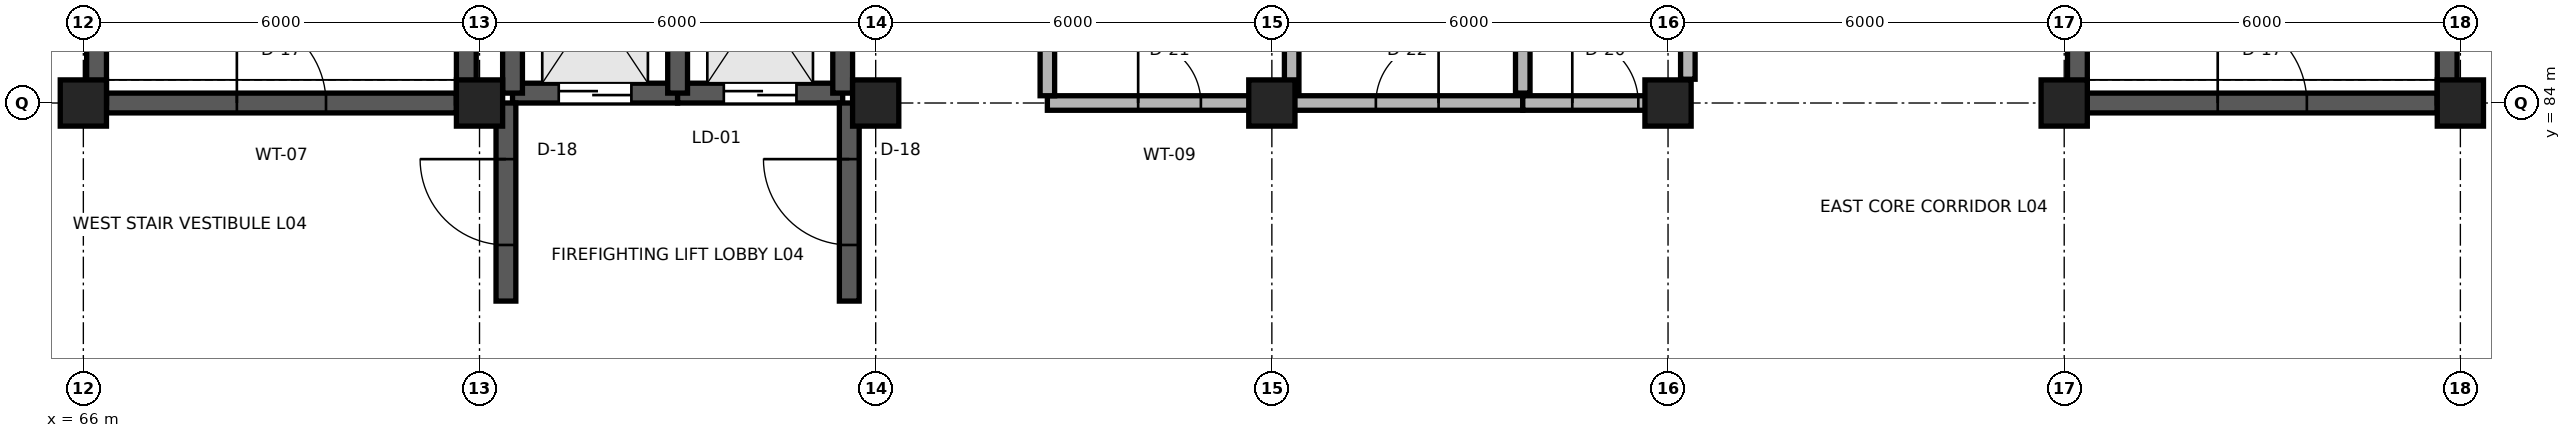
"""IFC4 building model, lengths in metres.
Left out: names, types, materials, properties, quantities, classifications, styles, units other than length and angle.
Written with IfcOpenShell. Run it as: python <this file> out.ifc"""

import sys

from ifc_helpers import new_model, si_unit, direction, frame, frame_2d, origin, origin_2d, place, context, subcontext, project, spatial, rectangle, extrude, element, fill, save


model = new_model("IFC4")
c1 = context("Model", 3, precision=1e-05, world=origin(), true_north=direction((0.0, 1.0)))
c2 = subcontext(c1, "Body", "Model", "MODEL_VIEW")
j1 = project(units=[si_unit("LENGTHUNIT", "METRE"), si_unit("PLANEANGLEUNIT", "RADIAN")], contexts=[c1])
p1 = place(None, origin())
s1 = spatial("IfcSite", under=j1, at=p1, CompositionType="ELEMENT")
p2 = place(p1, origin())
s2 = spatial("IfcBuilding", under=s1, at=p2, CompositionType="ELEMENT")
p3 = place(p2, frame((0.0, 0.0, 16.5)))
s3 = spatial("IfcBuildingStorey", under=s2, at=p3, CompositionType="ELEMENT", Elevation=16.5)
for number, where, z_axis, x_axis in (
    (1, (66.0, 84.0, 0.0), (0.0, 0.0, 1.0), (1.0, 0.0, 0.0)),
    (2, (72.0, 84.0, 0.0), (0.0, 0.0, 1.0), (1.0, 0.0, 0.0)),
    (3, (78.0, 84.0, 0.0), (0.0, 0.0, 1.0), (1.0, 0.0, 0.0)),
    (4, (84.0, 84.0, 0.0), (0.0, 0.0, 1.0), (1.0, 0.0, 0.0)),
    (5, (90.0, 84.0, 0.0), (0.0, 0.0, 1.0), (1.0, 0.0, 0.0)),
    (6, (96.0, 84.0, 0.0), (0.0, 0.0, 1.0), (1.0, 0.0, 0.0)),
    (7, (102.0, 84.0, 0.0), (0.0, 0.0, 1.0), (1.0, 0.0, 0.0)),
):
    element("IfcColumn", number, at=place(p3, frame(where, z_axis=z_axis, x_axis=x_axis)), inside=s3, PredefinedType="COLUMN", context=c2, shape_type="SweptSolid", body=[
        extrude(rectangle(XDim=0.7, YDim=0.7, at=origin_2d()), origin(), (0.0, 0.0, 1.0), 4.5),
    ])
p4 = place(p3, frame((66.35, 84.0, 0.0), z_axis=(0.0, 0.0, 1.0), x_axis=(1.0, 0.0, 0.0)))
e8 = element("IfcWall", 8, at=p4, inside=s3, PredefinedType="SHEAR", context=c2, shape_type="SweptSolid", body=[
    extrude(rectangle(XDim=5.3, YDim=0.3, at=frame_2d((2.65, 0.0))), origin(), (0.0, 0.0, 1.0), 4.26),
])
p5 = place(p4, frame((1.975, 0.0, 0.0)))
e9 = element("IfcOpeningElement", 9, at=p5, cuts=e8, PredefinedType="OPENING", context=c2, shape_type="SweptSolid", body=[
    extrude(rectangle(XDim=1.35, YDim=2.2, at=frame_2d((0.675, 1.1))), frame((0.0, 0.165, 0.0), z_axis=(0.0, -1.0, 0.0), x_axis=(1.0, 0.0, 0.0)), (0.0, 0.0, 1.0), 0.33),
])
for number, where, z_axis, x_axis in (
    (10, (66.2, 84.0, 0.0), (0.0, 0.0, 1.0), (0.0, 1.0, 0.0)),
    (11, (71.8, 84.0, 0.0), (0.0, 0.0, 1.0), (0.0, 1.0, 0.0)),
):
    element("IfcWall", number, at=place(p3, frame(where, z_axis=z_axis, x_axis=x_axis)), inside=s3, PredefinedType="SHEAR", context=c2, shape_type="SweptSolid", body=[
        extrude(rectangle(XDim=11.8, YDim=0.3, at=frame_2d((5.9, 0.0))), origin(), (0.0, 0.0, 1.0), 4.34),
    ])
p6 = place(p3, frame((96.35, 84.0, 0.0), z_axis=(0.0, 0.0, 1.0), x_axis=(1.0, 0.0, 0.0)))
e12 = element("IfcWall", 12, at=p6, inside=s3, PredefinedType="SHEAR", context=c2, shape_type="SweptSolid", body=[
    extrude(rectangle(XDim=5.3, YDim=0.3, at=frame_2d((2.65, 0.0))), origin(), (0.0, 0.0, 1.0), 4.26),
])
p7 = place(p6, frame((1.975, 0.0, 0.0)))
e13 = element("IfcOpeningElement", 13, at=p7, cuts=e12, PredefinedType="OPENING", context=c2, shape_type="SweptSolid", body=[
    extrude(rectangle(XDim=1.35, YDim=2.2, at=frame_2d((0.675, 1.1))), frame((0.0, 0.165, 0.0), z_axis=(0.0, -1.0, 0.0), x_axis=(1.0, 0.0, 0.0)), (0.0, 0.0, 1.0), 0.33),
])
for number, where, z_axis, x_axis in (
    (14, (96.2, 84.0, 0.0), (0.0, 0.0, 1.0), (0.0, 1.0, 0.0)),
    (15, (101.8, 84.0, 0.0), (0.0, 0.0, 1.0), (0.0, 1.0, 0.0)),
):
    element("IfcWall", number, at=place(p3, frame(where, z_axis=z_axis, x_axis=x_axis)), inside=s3, PredefinedType="SHEAR", context=c2, shape_type="SweptSolid", body=[
        extrude(rectangle(XDim=11.8, YDim=0.3, at=frame_2d((5.9, 0.0))), origin(), (0.0, 0.0, 1.0), 4.34),
    ])
p8 = place(p3, frame((72.5, 84.15, 0.0), z_axis=(0.0, 0.0, 1.0), x_axis=(1.0, 0.0, 0.0)))
e16 = element("IfcWall", 16, at=p8, inside=s3, PredefinedType="SHEAR", context=c2, shape_type="SweptSolid", body=[
    extrude(rectangle(XDim=2.5, YDim=0.3, at=frame_2d((1.25, 0.0))), origin(), (0.0, 0.0, 1.0), 4.34),
])
p9 = place(p8, frame((0.7, 0.0, 0.0)))
e17 = element("IfcOpeningElement", 17, at=p9, cuts=e16, PredefinedType="OPENING", context=c2, shape_type="SweptSolid", body=[
    extrude(rectangle(XDim=1.1, YDim=2.1, at=frame_2d((0.55, 1.05))), frame((0.0, 0.165, 0.0), z_axis=(0.0, -1.0, 0.0), x_axis=(1.0, 0.0, 0.0)), (0.0, 0.0, 1.0), 0.33),
])
p10 = place(p3, frame((72.5, 84.15, 0.0), z_axis=(0.0, 0.0, 1.0), x_axis=(0.0, 1.0, 0.0)))
e18 = element("IfcWall", 18, at=p10, inside=s3, PredefinedType="SHEAR", context=c2, shape_type="SweptSolid", body=[
    extrude(rectangle(XDim=3.4, YDim=0.3, at=frame_2d((1.7, 0.0))), origin(), (0.0, 0.0, 1.0), 4.34),
])
p11 = place(p3, frame((75.0, 84.15, 0.0), z_axis=(0.0, 0.0, 1.0), x_axis=(1.0, 0.0, 0.0)))
e19 = element("IfcWall", 19, at=p11, inside=s3, PredefinedType="SHEAR", context=c2, shape_type="SweptSolid", body=[
    extrude(rectangle(XDim=2.5, YDim=0.3, at=frame_2d((1.25, 0.0))), origin(), (0.0, 0.0, 1.0), 4.34),
])
p12 = place(p11, frame((0.7, 0.0, 0.0)))
e20 = element("IfcOpeningElement", 20, at=p12, cuts=e19, PredefinedType="OPENING", context=c2, shape_type="SweptSolid", body=[
    extrude(rectangle(XDim=1.1, YDim=2.1, at=frame_2d((0.55, 1.05))), frame((0.0, 0.165, 0.0), z_axis=(0.0, -1.0, 0.0), x_axis=(1.0, 0.0, 0.0)), (0.0, 0.0, 1.0), 0.33),
])
for number, where, z_axis, x_axis in (
    (21, (75.0, 84.15, 0.0), (0.0, 0.0, 1.0), (0.0, 1.0, 0.0)),
    (22, (77.5, 84.15, 0.0), (0.0, 0.0, 1.0), (0.0, 1.0, 0.0)),
):
    element("IfcWall", number, at=place(p3, frame(where, z_axis=z_axis, x_axis=x_axis)), inside=s3, PredefinedType="SHEAR", context=c2, shape_type="SweptSolid", body=[
        extrude(rectangle(XDim=3.4, YDim=0.3, at=frame_2d((1.7, 0.0))), origin(), (0.0, 0.0, 1.0), 4.34),
    ])
p13 = place(p3, frame((72.4, 81.0, 0.0), z_axis=(0.0, 0.0, 1.0), x_axis=(0.0, 1.0, 0.0)))
e23 = element("IfcWall", 23, at=p13, inside=s3, PredefinedType="SHEAR", context=c2, shape_type="SweptSolid", body=[
    extrude(rectangle(XDim=3.0, YDim=0.3, at=frame_2d((1.5, 0.0))), origin(), (0.0, 0.0, 1.0), 4.0),
])
p14 = place(p13, frame((0.85, 0.0, 0.0)))
e24 = element("IfcOpeningElement", 24, at=p14, cuts=e23, PredefinedType="OPENING", context=c2, shape_type="SweptSolid", body=[
    extrude(rectangle(XDim=1.3, YDim=2.2, at=frame_2d((0.65, 1.1))), frame((0.0, 0.165, 0.0), z_axis=(0.0, -1.0, 0.0), x_axis=(1.0, 0.0, 0.0)), (0.0, 0.0, 1.0), 0.33),
])
p15 = place(p3, frame((77.6, 81.0, 0.0), z_axis=(0.0, 0.0, 1.0), x_axis=(0.0, 1.0, 0.0)))
e25 = element("IfcWall", 25, at=p15, inside=s3, PredefinedType="SHEAR", context=c2, shape_type="SweptSolid", body=[
    extrude(rectangle(XDim=3.0, YDim=0.3, at=frame_2d((1.5, 0.0))), origin(), (0.0, 0.0, 1.0), 4.0),
])
p16 = place(p15, frame((0.85, 0.0, 0.0)))
e26 = element("IfcOpeningElement", 26, at=p16, cuts=e25, PredefinedType="OPENING", context=c2, shape_type="SweptSolid", body=[
    extrude(rectangle(XDim=1.3, YDim=2.2, at=frame_2d((0.65, 1.1))), frame((0.0, 0.165, 0.0), z_axis=(0.0, -1.0, 0.0), x_axis=(1.0, 0.0, 0.0)), (0.0, 0.0, 1.0), 0.33),
])
p17 = place(p3, frame((80.6, 84.0, 0.0), z_axis=(0.0, 0.0, 1.0), x_axis=(1.0, 0.0, 0.0)))
e27 = element("IfcWall", 27, at=p17, inside=s3, PredefinedType="PARTITIONING", context=c2, shape_type="SweptSolid", body=[
    extrude(rectangle(XDim=3.7, YDim=0.22, at=frame_2d((1.85, 0.0))), origin(), (0.0, 0.0, 1.0), 3.9),
])
p18 = place(p17, frame((1.375, 0.0, 0.0)))
e28 = element("IfcOpeningElement", 28, at=p18, cuts=e27, PredefinedType="OPENING", context=c2, shape_type="SweptSolid", body=[
    extrude(rectangle(XDim=0.95, YDim=2.15, at=frame_2d((0.475, 1.075))), frame((0.0, 0.125, 0.0), z_axis=(0.0, -1.0, 0.0), x_axis=(1.0, 0.0, 0.0)), (0.0, 0.0, 1.0), 0.25),
])
p19 = place(p3, frame((84.3, 84.0, 0.0), z_axis=(0.0, 0.0, 1.0), x_axis=(1.0, 0.0, 0.0)))
e29 = element("IfcWall", 29, at=p19, inside=s3, PredefinedType="PARTITIONING", context=c2, shape_type="SweptSolid", body=[
    extrude(rectangle(XDim=3.5, YDim=0.22, at=frame_2d((1.75, 0.0))), origin(), (0.0, 0.0, 1.0), 3.9),
])
p20 = place(p19, frame((1.275, 0.0, 0.0)))
e30 = element("IfcOpeningElement", 30, at=p20, cuts=e29, PredefinedType="OPENING", context=c2, shape_type="SweptSolid", body=[
    extrude(rectangle(XDim=0.95, YDim=2.1, at=frame_2d((0.475, 1.05))), frame((0.0, 0.125, 0.0), z_axis=(0.0, -1.0, 0.0), x_axis=(1.0, 0.0, 0.0)), (0.0, 0.0, 1.0), 0.25),
])
p21 = place(p3, frame((87.8, 84.0, 0.0), z_axis=(0.0, 0.0, 1.0), x_axis=(1.0, 0.0, 0.0)))
e31 = element("IfcWall", 31, at=p21, inside=s3, PredefinedType="PARTITIONING", context=c2, shape_type="SweptSolid", body=[
    extrude(rectangle(XDim=2.5, YDim=0.22, at=frame_2d((1.25, 0.0))), origin(), (0.0, 0.0, 1.0), 3.9),
])
p22 = place(p21, frame((0.75, 0.0, 0.0)))
e32 = element("IfcOpeningElement", 32, at=p22, cuts=e31, PredefinedType="OPENING", context=c2, shape_type="SweptSolid", body=[
    extrude(rectangle(XDim=1.0, YDim=2.15, at=frame_2d((0.5, 1.075))), frame((0.0, 0.125, 0.0), z_axis=(0.0, -1.0, 0.0), x_axis=(1.0, 0.0, 0.0)), (0.0, 0.0, 1.0), 0.25),
])
for number, where, z_axis, x_axis in (
    (33, (84.3, 84.15, 0.0), (0.0, 0.0, 1.0), (0.0, 1.0, 0.0)),
    (34, (87.8, 84.15, 0.0), (0.0, 0.0, 1.0), (0.0, 1.0, 0.0)),
):
    element("IfcWall", number, at=place(p3, frame(where, z_axis=z_axis, x_axis=x_axis)), inside=s3, PredefinedType="PARTITIONING", context=c2, shape_type="SweptSolid", body=[
        extrude(rectangle(XDim=5.0, YDim=0.22, at=frame_2d((2.5, 0.0))), origin(), (0.0, 0.0, 1.0), 4.0),
    ])
p23 = place(p3, frame((80.6, 84.11, 0.0), z_axis=(0.0, 0.0, 1.0), x_axis=(0.0, 1.0, 0.0)))
e35 = element("IfcWall", 35, at=p23, inside=s3, PredefinedType="PARTITIONING", context=c2, shape_type="SweptSolid", body=[
    extrude(rectangle(XDim=4.98, YDim=0.22, at=frame_2d((2.49, 0.0))), origin(), (0.0, 0.0, 1.0), 4.0),
])
p24 = place(p3, frame((90.3, 84.36, 0.0), z_axis=(0.0, 0.0, 1.0), x_axis=(0.0, 1.0, 0.0)))
e36 = element("IfcWall", 36, at=p24, inside=s3, PredefinedType="PARTITIONING", context=c2, shape_type="SweptSolid", body=[
    extrude(rectangle(XDim=4.73, YDim=0.22, at=frame_2d((2.365, 0.0))), origin(), (0.0, 0.0, 1.0), 4.0),
])
p25 = place(p5, origin())
e37 = element("IfcDoor", 37, at=p25, inside=s3, OperationType="SINGLE_SWING_LEFT", PredefinedType="DOOR", context=c2, shape_type="SweptSolid", body=[
    extrude(rectangle(XDim=1.35, YDim=2.2, at=frame_2d((0.675, 1.1))), frame((0.0, 0.025, 0.0), z_axis=(0.0, -1.0, 0.0), x_axis=(1.0, 0.0, 0.0)), (0.0, 0.0, 1.0), 0.05),
])
fill(e9, e37)
p26 = place(p7, origin())
e38 = element("IfcDoor", 38, at=p26, inside=s3, OperationType="SINGLE_SWING_LEFT", PredefinedType="DOOR", context=c2, shape_type="SweptSolid", body=[
    extrude(rectangle(XDim=1.35, YDim=2.2, at=frame_2d((0.675, 1.1))), frame((0.0, 0.025, 0.0), z_axis=(0.0, -1.0, 0.0), x_axis=(1.0, 0.0, 0.0)), (0.0, 0.0, 1.0), 0.05),
])
fill(e13, e38)
p27 = place(p9, origin())
e39 = element("IfcDoor", 39, at=p27, inside=s3, OperationType="DOUBLE_DOOR_SLIDING", PredefinedType="DOOR", context=c2, shape_type="SweptSolid", body=[
    extrude(rectangle(XDim=1.1, YDim=2.1, at=frame_2d((0.55, 1.05))), frame((0.0, 0.025, 0.0), z_axis=(0.0, -1.0, 0.0), x_axis=(1.0, 0.0, 0.0)), (0.0, 0.0, 1.0), 0.05),
])
fill(e17, e39)
p28 = place(p12, origin())
e40 = element("IfcDoor", 40, at=p28, inside=s3, OperationType="DOUBLE_DOOR_SLIDING", PredefinedType="DOOR", context=c2, shape_type="SweptSolid", body=[
    extrude(rectangle(XDim=1.1, YDim=2.1, at=frame_2d((0.55, 1.05))), frame((0.0, 0.025, 0.0), z_axis=(0.0, -1.0, 0.0), x_axis=(1.0, 0.0, 0.0)), (0.0, 0.0, 1.0), 0.05),
])
fill(e20, e40)
p29 = place(p14, origin())
e41 = element("IfcDoor", 41, at=p29, inside=s3, OperationType="SINGLE_SWING_RIGHT", PredefinedType="DOOR", context=c2, shape_type="SweptSolid", body=[
    extrude(rectangle(XDim=1.3, YDim=2.2, at=frame_2d((0.65, 1.1))), frame((0.0, 0.025, 0.0), z_axis=(0.0, -1.0, 0.0), x_axis=(1.0, 0.0, 0.0)), (0.0, 0.0, 1.0), 0.05),
])
fill(e24, e41)
p30 = place(p16, origin())
e42 = element("IfcDoor", 42, at=p30, inside=s3, OperationType="SINGLE_SWING_RIGHT", PredefinedType="DOOR", context=c2, shape_type="SweptSolid", body=[
    extrude(rectangle(XDim=1.3, YDim=2.2, at=frame_2d((0.65, 1.1))), frame((0.0, 0.025, 0.0), z_axis=(0.0, -1.0, 0.0), x_axis=(1.0, 0.0, 0.0)), (0.0, 0.0, 1.0), 0.05),
])
fill(e26, e42)
p31 = place(p18, origin())
e43 = element("IfcDoor", 43, at=p31, inside=s3, OperationType="SINGLE_SWING_LEFT", PredefinedType="DOOR", context=c2, shape_type="SweptSolid", body=[
    extrude(rectangle(XDim=0.95, YDim=2.15, at=frame_2d((0.475, 1.075))), frame((0.0, 0.025, 0.0), z_axis=(0.0, -1.0, 0.0), x_axis=(1.0, 0.0, 0.0)), (0.0, 0.0, 1.0), 0.05),
])
fill(e28, e43)
p32 = place(p20, origin())
e44 = element("IfcDoor", 44, at=p32, inside=s3, OperationType="SINGLE_SWING_RIGHT", PredefinedType="DOOR", context=c2, shape_type="SweptSolid", body=[
    extrude(rectangle(XDim=0.95, YDim=2.1, at=frame_2d((0.475, 1.05))), frame((0.0, 0.025, 0.0), z_axis=(0.0, -1.0, 0.0), x_axis=(1.0, 0.0, 0.0)), (0.0, 0.0, 1.0), 0.05),
])
fill(e30, e44)
p33 = place(p22, origin())
e45 = element("IfcDoor", 45, at=p33, inside=s3, OperationType="SINGLE_SWING_LEFT", PredefinedType="DOOR", context=c2, shape_type="SweptSolid", body=[
    extrude(rectangle(XDim=1.0, YDim=2.15, at=frame_2d((0.5, 1.075))), frame((0.0, 0.025, 0.0), z_axis=(0.0, -1.0, 0.0), x_axis=(1.0, 0.0, 0.0)), (0.0, 0.0, 1.0), 0.05),
])
fill(e32, e45)
save(model, sys.argv[1])
